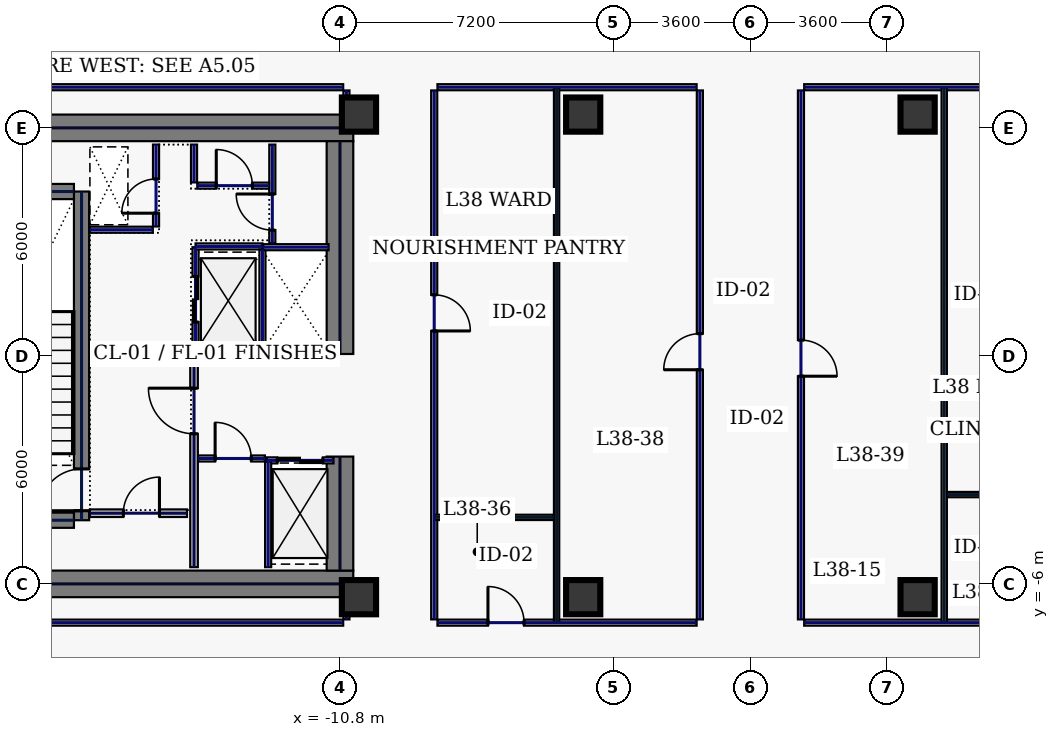
"""IFC4 building model, lengths in metres.
Left out: names, types, materials, properties, quantities, classifications, styles, units other than length and angle.
Written with IfcOpenShell. Run it as: python <this file> out.ifc"""

import sys

from ifc_helpers import new_model, si_unit, direction, frame, frame_2d, origin, origin_2d, place, context, subcontext, project, spatial, rectangle, hollow_rectangle, extrude, element, fill, save


model = new_model("IFC4")
c1 = context("Model", 3, precision=1e-05, world=origin(), true_north=direction((0.0, 1.0)))
c2 = subcontext(c1, "Body", "Model", "MODEL_VIEW")
j1 = project(units=[si_unit("LENGTHUNIT", "METRE"), si_unit("PLANEANGLEUNIT", "RADIAN")], contexts=[c1])
p1 = place(None, origin())
s1 = spatial("IfcSite", under=j1, at=p1, CompositionType="ELEMENT")
p2 = place(p1, origin())
s2 = spatial("IfcBuilding", under=s1, at=p2, CompositionType="ELEMENT")
p3 = place(p2, frame((0.0, 0.0, 168.2)))
s3 = spatial("IfcBuildingStorey", under=s2, at=p3, CompositionType="ELEMENT", Elevation=168.2)
for number, where, z_axis, x_axis in (
    (1, (-22.0, 6.0, 0.0), (0.0, 0.0, 1.0), (1.0, 0.0, 0.0)),
    (2, (-22.0, -6.0, 0.0), (0.0, 0.0, 1.0), (1.0, 0.0, 0.0)),
):
    element("IfcWall", number, at=place(p3, frame(where, z_axis=z_axis, x_axis=x_axis)), inside=s3, PredefinedType="SHEAR", context=c2, shape_type="SweptSolid", body=[
        extrude(rectangle(XDim=11.55, YDim=0.7, at=frame_2d((5.775, 0.0))), origin(), (0.0, 0.0, 1.0), 3.74),
    ])
p4 = place(p3, frame((-10.8, -5.65, 0.0), z_axis=(0.0, 0.0, 1.0), x_axis=(0.0, 1.0, 0.0)))
e3 = element("IfcWall", 3, at=p4, inside=s3, PredefinedType="SHEAR", context=c2, shape_type="SweptSolid", body=[
    extrude(rectangle(XDim=3.0, YDim=0.7, at=frame_2d((1.5, 0.0))), origin(), (0.0, 0.0, 1.0), 3.74),
])
p5 = place(p3, frame((-10.8, 0.05, 0.0), z_axis=(0.0, 0.0, 1.0), x_axis=(0.0, 1.0, 0.0)))
e4 = element("IfcWall", 4, at=p5, inside=s3, PredefinedType="SHEAR", context=c2, shape_type="SweptSolid", body=[
    extrude(rectangle(XDim=5.6, YDim=0.7, at=frame_2d((2.8, 0.0))), origin(), (0.0, 0.0, 1.0), 3.74),
])
p6 = place(p3, frame((-17.6, -4.325, 0.0), z_axis=(0.0, 0.0, 1.0), x_axis=(0.0, 1.0, 0.0)))
e5 = element("IfcWall", 5, at=p6, inside=s3, PredefinedType="SHEAR", context=c2, shape_type="SweptSolid", body=[
    extrude(rectangle(XDim=8.65, YDim=0.4, at=frame_2d((4.325, 0.0))), origin(), (0.0, 0.0, 1.0), 3.74),
])
p7 = place(p6, frame((0.25, 0.0, 0.0)))
e6 = element("IfcOpeningElement", 6, at=p7, cuts=e5, PredefinedType="OPENING", context=c2, shape_type="SweptSolid", body=[
    extrude(rectangle(XDim=1.1, YDim=2.2, at=frame_2d((0.55, 1.1))), frame((0.0, 0.21, 0.0), z_axis=(0.0, -1.0, 0.0), x_axis=(1.0, 0.0, 0.0)), (0.0, 0.0, 1.0), 0.42),
])
for number, where, z_axis, x_axis in (
    (7, (-21.2, -4.325, 0.0), (0.0, 0.0, 1.0), (1.0, 0.0, 0.0)),
    (8, (-21.2, 4.325, 0.0), (0.0, 0.0, 1.0), (1.0, 0.0, 0.0)),
):
    element("IfcWall", number, at=place(p3, frame(where, z_axis=z_axis, x_axis=x_axis)), inside=s3, PredefinedType="SHEAR", context=c2, shape_type="SweptSolid", body=[
        extrude(rectangle(XDim=3.4, YDim=0.4, at=frame_2d((1.7, 0.0))), origin(), (0.0, 0.0, 1.0), 3.74),
    ])
for number, where, z_axis, x_axis in (
    (9, (-10.3, -6.35, 0.0), (0.0, 0.0, 1.0), (1.0, 0.0, 0.0)),
    (10, (-10.3, 6.35, 0.0), (0.0, 0.0, 1.0), (1.0, 0.0, 0.0)),
    (11, (-4.4, -6.35, 0.0), (0.0, 0.0, 1.0), (1.0, 0.0, 0.0)),
    (12, (4.4, -6.35, 0.0), (0.0, 0.0, 1.0), (1.0, 0.0, 0.0)),
    (13, (-4.4, 6.35, 0.0), (0.0, 0.0, 1.0), (1.0, 0.0, 0.0)),
    (14, (4.4, 6.35, 0.0), (0.0, 0.0, 1.0), (1.0, 0.0, 0.0)),
):
    element("IfcColumn", number, at=place(p3, frame(where, z_axis=z_axis, x_axis=x_axis)), inside=s3, PredefinedType="COLUMN", context=c2, shape_type="SweptSolid", body=[
        extrude(hollow_rectangle(XDim=0.9, YDim=0.9, WallThickness=0.04, at=origin_2d()), origin(), (0.0, 0.0, 1.0), 3.74),
    ])
p8 = place(p3, frame((-14.6, 0.12, 0.0), z_axis=(0.0, 0.0, 1.0), x_axis=(0.0, 1.0, 0.0)))
e15 = element("IfcWall", 15, at=p8, inside=s3, PredefinedType="PARTITIONING", context=c2, shape_type="SweptSolid", body=[
    extrude(rectangle(XDim=2.74, YDim=0.16, at=frame_2d((1.37, 0.0))), origin(), (0.0, 0.0, 1.0), 3.74),
])
p9 = place(p8, frame((0.77, 0.0, 0.0)))
e16 = element("IfcOpeningElement", 16, at=p9, cuts=e15, PredefinedType="OPENING", context=c2, shape_type="SweptSolid", body=[
    extrude(rectangle(XDim=1.2, YDim=2.2, at=frame_2d((0.6, 1.1))), frame((0.0, 0.09, 0.0), z_axis=(0.0, -1.0, 0.0), x_axis=(1.0, 0.0, 0.0)), (0.0, 0.0, 1.0), 0.18),
])
for number, where, z_axis, x_axis in (
    (17, (-14.6, 0.1, 0.0), (0.0, 0.0, 1.0), (1.0, 0.0, 0.0)),
    (18, (-14.6, 2.88, 0.0), (0.0, 0.0, 1.0), (1.0, 0.0, 0.0)),
):
    element("IfcWall", number, at=place(p3, frame(where, z_axis=z_axis, x_axis=x_axis)), inside=s3, PredefinedType="PARTITIONING", context=c2, shape_type="SweptSolid", body=[
        extrude(rectangle(XDim=1.76, YDim=0.16, at=frame_2d((0.88, 0.0))), origin(), (0.0, 0.0, 1.0), 3.74),
    ])
p10 = place(p3, frame((-12.84, 0.18, 0.0), z_axis=(0.0, 0.0, 1.0), x_axis=(0.0, 1.0, 0.0)))
e19 = element("IfcWall", 19, at=p10, inside=s3, PredefinedType="PARTITIONING", context=c2, shape_type="SweptSolid", body=[
    extrude(rectangle(XDim=2.62, YDim=0.16, at=frame_2d((1.31, 0.0))), origin(), (0.0, 0.0, 1.0), 3.74),
])
p11 = place(p3, frame((-12.73, -2.75, 0.0), z_axis=(0.0, 0.0, 1.0), x_axis=(1.0, 0.0, 0.0)))
e20 = element("IfcWall", 20, at=p11, inside=s3, PredefinedType="PARTITIONING", context=c2, shape_type="SweptSolid", body=[
    extrude(rectangle(XDim=1.76, YDim=0.16, at=frame_2d((0.88, 0.0))), origin(), (0.0, 0.0, 1.0), 3.74),
])
p12 = place(p11, frame((0.28, 0.0, 0.0)))
e21 = element("IfcOpeningElement", 21, at=p12, cuts=e20, PredefinedType="OPENING", context=c2, shape_type="SweptSolid", body=[
    extrude(rectangle(XDim=1.2, YDim=2.2, at=frame_2d((0.6, 1.1))), frame((0.0, 0.09, 0.0), z_axis=(0.0, -1.0, 0.0), x_axis=(1.0, 0.0, 0.0)), (0.0, 0.0, 1.0), 0.18),
])
for number, where, z_axis, x_axis in (
    (22, (-12.82, 0.06, 0.0), (0.0, 0.0, 1.0), (1.0, 0.0, 0.0)),
    (23, (-12.82, 2.86, 0.0), (0.0, 0.0, 1.0), (1.0, 0.0, 0.0)),
):
    element("IfcWall", number, at=place(p3, frame(where, z_axis=z_axis, x_axis=x_axis)), inside=s3, PredefinedType="PARTITIONING", context=c2, shape_type="SweptSolid", body=[
        extrude(rectangle(XDim=1.72, YDim=0.16, at=frame_2d((0.86, 0.0))), origin(), (0.0, 0.0, 1.0), 3.74),
    ])
p13 = place(p3, frame((-15.64, 3.405, 0.0), z_axis=(0.0, 0.0, 1.0), x_axis=(0.0, 1.0, 0.0)))
e24 = element("IfcWall", 24, at=p13, inside=s3, PredefinedType="PARTITIONING", context=c2, shape_type="SweptSolid", body=[
    extrude(rectangle(XDim=2.155, YDim=0.16, at=frame_2d((1.078, 0.0))), origin(), (0.0, 0.0, 1.0), 3.74),
])
p14 = place(p13, frame((0.35, 0.0, 0.0)))
e25 = element("IfcOpeningElement", 25, at=p14, cuts=e24, PredefinedType="OPENING", context=c2, shape_type="SweptSolid", body=[
    extrude(rectangle(XDim=0.9, YDim=2.2, at=frame_2d((0.45, 1.1))), frame((0.0, 0.09, 0.0), z_axis=(0.0, -1.0, 0.0), x_axis=(1.0, 0.0, 0.0)), (0.0, 0.0, 1.0), 0.18),
])
p15 = place(p3, frame((-17.38, 3.32, 0.0), z_axis=(0.0, 0.0, 1.0), x_axis=(1.0, 0.0, 0.0)))
e26 = element("IfcWall", 26, at=p15, inside=s3, PredefinedType="PARTITIONING", context=c2, shape_type="SweptSolid", body=[
    extrude(rectangle(XDim=1.655, YDim=0.16, at=frame_2d((0.827, 0.0))), origin(), (0.0, 0.0, 1.0), 3.74),
])
p16 = place(p3, frame((-17.38, -4.14, 0.0), z_axis=(0.0, 0.0, 1.0), x_axis=(1.0, 0.0, 0.0)))
e27 = element("IfcWall", 27, at=p16, inside=s3, PredefinedType="SOLIDWALL", context=c2, shape_type="SweptSolid", body=[
    extrude(rectangle(XDim=2.555, YDim=0.2, at=frame_2d((1.277, 0.0))), origin(), (0.0, 0.0, 1.0), 3.74),
])
p17 = place(p16, frame((0.88, 0.0, 0.0)))
e28 = element("IfcOpeningElement", 28, at=p17, cuts=e27, PredefinedType="OPENING", context=c2, shape_type="SweptSolid", body=[
    extrude(rectangle(XDim=0.95, YDim=2.2, at=frame_2d((0.475, 1.1))), frame((0.0, 0.11, 0.0), z_axis=(0.0, -1.0, 0.0), x_axis=(1.0, 0.0, 0.0)), (0.0, 0.0, 1.0), 0.22),
])
p18 = place(p3, frame((-14.535, -2.7, 0.0), z_axis=(0.0, 0.0, 1.0), x_axis=(1.0, 0.0, 0.0)))
e29 = element("IfcWall", 29, at=p18, inside=s3, PredefinedType="PARTITIONING", context=c2, shape_type="SweptSolid", body=[
    extrude(rectangle(XDim=1.76, YDim=0.16, at=frame_2d((0.88, 0.0))), origin(), (0.0, 0.0, 1.0), 3.74),
])
p19 = place(p18, frame((0.45, 0.0, 0.0)))
e30 = element("IfcOpeningElement", 30, at=p19, cuts=e29, PredefinedType="OPENING", context=c2, shape_type="SweptSolid", body=[
    extrude(rectangle(XDim=0.95, YDim=2.2, at=frame_2d((0.475, 1.1))), frame((0.0, 0.09, 0.0), z_axis=(0.0, -1.0, 0.0), x_axis=(1.0, 0.0, 0.0)), (0.0, 0.0, 1.0), 0.18),
])
p20 = place(p3, frame((-12.69, -5.56, 0.0), z_axis=(0.0, 0.0, 1.0), x_axis=(0.0, 1.0, 0.0)))
e31 = element("IfcWall", 31, at=p20, inside=s3, PredefinedType="PARTITIONING", context=c2, shape_type="SweptSolid", body=[
    extrude(rectangle(XDim=2.775, YDim=0.16, at=frame_2d((1.388, 0.0))), origin(), (0.0, 0.0, 1.0), 3.74),
])
p21 = place(p3, frame((-12.58, 2.96, 0.0), z_axis=(0.0, 0.0, 1.0), x_axis=(0.0, 1.0, 0.0)))
e32 = element("IfcWall", 32, at=p21, inside=s3, PredefinedType="PARTITIONING", context=c2, shape_type="SweptSolid", body=[
    extrude(rectangle(XDim=2.6, YDim=0.16, at=frame_2d((1.3, 0.0))), origin(), (0.0, 0.0, 1.0), 3.74),
])
p22 = place(p21, frame((0.35, 0.0, 0.0)))
e33 = element("IfcOpeningElement", 33, at=p22, cuts=e32, PredefinedType="OPENING", context=c2, shape_type="SweptSolid", body=[
    extrude(rectangle(XDim=0.95, YDim=2.2, at=frame_2d((0.475, 1.1))), frame((0.0, 0.09, 0.0), z_axis=(0.0, -1.0, 0.0), x_axis=(1.0, 0.0, 0.0)), (0.0, 0.0, 1.0), 0.18),
])
p23 = place(p3, frame((-14.555, 4.48, 0.0), z_axis=(0.0, 0.0, 1.0), x_axis=(1.0, 0.0, 0.0)))
e34 = element("IfcWall", 34, at=p23, inside=s3, PredefinedType="PARTITIONING", context=c2, shape_type="SweptSolid", body=[
    extrude(rectangle(XDim=1.89, YDim=0.16, at=frame_2d((0.945, 0.0))), origin(), (0.0, 0.0, 1.0), 3.74),
])
p24 = place(p23, frame((0.5, 0.0, 0.0)))
e35 = element("IfcOpeningElement", 35, at=p24, cuts=e34, PredefinedType="OPENING", context=c2, shape_type="SweptSolid", body=[
    extrude(rectangle(XDim=0.95, YDim=2.2, at=frame_2d((0.475, 1.1))), frame((0.0, 0.09, 0.0), z_axis=(0.0, -1.0, 0.0), x_axis=(1.0, 0.0, 0.0)), (0.0, 0.0, 1.0), 0.18),
])
p25 = place(p3, frame((-14.64, 4.565, 0.0), z_axis=(0.0, 0.0, 1.0), x_axis=(0.0, 1.0, 0.0)))
e36 = element("IfcWall", 36, at=p25, inside=s3, PredefinedType="PARTITIONING", context=c2, shape_type="SweptSolid", body=[
    extrude(rectangle(XDim=0.995, YDim=0.16, at=frame_2d((0.498, 0.0))), origin(), (0.0, 0.0, 1.0), 3.74),
])
p26 = place(p3, frame((-14.64, -5.56, 0.0), z_axis=(0.0, 0.0, 1.0), x_axis=(0.0, 1.0, 0.0)))
e37 = element("IfcWall", 37, at=p26, inside=s3, PredefinedType="SOLIDWALL", context=c2, shape_type="SweptSolid", body=[
    extrude(rectangle(XDim=5.6, YDim=0.2, at=frame_2d((2.8, 0.0))), origin(), (0.0, 0.0, 1.0), 3.74),
])
p27 = place(p26, frame((3.51, 0.0, 0.0)))
e38 = element("IfcOpeningElement", 38, at=p27, cuts=e37, PredefinedType="OPENING", context=c2, shape_type="SweptSolid", body=[
    extrude(rectangle(XDim=1.2, YDim=2.2, at=frame_2d((0.6, 1.1))), frame((0.0, 0.11, 0.0), z_axis=(0.0, -1.0, 0.0), x_axis=(1.0, 0.0, 0.0)), (0.0, 0.0, 1.0), 0.22),
])
p28 = place(p3, frame((-24.965, -7.02, 0.0), z_axis=(0.0, 0.0, 1.0), x_axis=(1.0, 0.0, 0.0)))
e39 = element("IfcWall", 39, at=p28, inside=s3, PredefinedType="PARTITIONING", context=c2, shape_type="SweptSolid", body=[
    extrude(rectangle(XDim=14.25, YDim=0.16, at=frame_2d((7.125, 0.0))), origin(), (0.0, 0.0, 1.0), 3.74),
])
p29 = place(p3, frame((-10.63, -6.935, 0.0), z_axis=(0.0, 0.0, 1.0), x_axis=(0.0, 1.0, 0.0)))
e40 = element("IfcWall", 40, at=p29, inside=s3, PredefinedType="PARTITIONING", context=c2, shape_type="SweptSolid", body=[
    extrude(rectangle(XDim=0.515, YDim=0.16, at=frame_2d((0.258, 0.0))), origin(), (0.0, 0.0, 1.0), 3.74),
])
p30 = place(p3, frame((-10.63, 6.42, 0.0), z_axis=(0.0, 0.0, 1.0), x_axis=(0.0, 1.0, 0.0)))
e41 = element("IfcWall", 41, at=p30, inside=s3, PredefinedType="PARTITIONING", context=c2, shape_type="SweptSolid", body=[
    extrude(rectangle(XDim=0.565, YDim=0.16, at=frame_2d((0.283, 0.0))), origin(), (0.0, 0.0, 1.0), 3.74),
])
p31 = place(p3, frame((-10.715, 7.07, 0.0), z_axis=(0.0, 0.0, 1.0), x_axis=(-1.0, 0.0, 0.0)))
e42 = element("IfcWall", 42, at=p31, inside=s3, PredefinedType="PARTITIONING", context=c2, shape_type="SweptSolid", body=[
    extrude(rectangle(XDim=14.25, YDim=0.16, at=frame_2d((7.125, 0.0))), origin(), (0.0, 0.0, 1.0), 3.74),
])
p32 = place(p3, frame((8.235, 7.07, 0.0), z_axis=(0.0, 0.0, 1.0), x_axis=(-1.0, 0.0, 0.0)))
e43 = element("IfcWall", 43, at=p32, inside=s3, PredefinedType="PARTITIONING", context=c2, shape_type="SweptSolid", body=[
    extrude(rectangle(XDim=6.82, YDim=0.16, at=frame_2d((3.41, 0.0))), origin(), (0.0, 0.0, 1.0), 3.74),
])
p33 = place(p3, frame((1.33, 6.985, 0.0), z_axis=(0.0, 0.0, 1.0), x_axis=(0.0, -1.0, 0.0)))
e44 = element("IfcWall", 44, at=p33, inside=s3, PredefinedType="PARTITIONING", context=c2, shape_type="SweptSolid", body=[
    extrude(rectangle(XDim=13.92, YDim=0.16, at=frame_2d((6.96, 0.0))), origin(), (0.0, 0.0, 1.0), 3.74),
])
p34 = place(p33, frame((6.57, 0.0, 0.0)))
e45 = element("IfcOpeningElement", 45, at=p34, cuts=e44, PredefinedType="OPENING", context=c2, shape_type="SweptSolid", body=[
    extrude(rectangle(XDim=0.95, YDim=2.2, at=frame_2d((0.475, 1.1))), frame((0.0, 0.09, 0.0), z_axis=(0.0, -1.0, 0.0), x_axis=(1.0, 0.0, 0.0)), (0.0, 0.0, 1.0), 0.18),
])
p35 = place(p3, frame((1.415, -7.02, 0.0), z_axis=(0.0, 0.0, 1.0), x_axis=(1.0, 0.0, 0.0)))
e46 = element("IfcWall", 46, at=p35, inside=s3, PredefinedType="PARTITIONING", context=c2, shape_type="SweptSolid", body=[
    extrude(rectangle(XDim=6.82, YDim=0.16, at=frame_2d((3.41, 0.0))), origin(), (0.0, 0.0, 1.0), 3.74),
])
p36 = place(p3, frame((-1.33, -6.935, 0.0), z_axis=(0.0, 0.0, 1.0), x_axis=(0.0, 1.0, 0.0)))
e47 = element("IfcWall", 47, at=p36, inside=s3, PredefinedType="PARTITIONING", context=c2, shape_type="SweptSolid", body=[
    extrude(rectangle(XDim=13.92, YDim=0.16, at=frame_2d((6.96, 0.0))), origin(), (0.0, 0.0, 1.0), 3.74),
])
p37 = place(p36, frame((6.57, 0.0, 0.0)))
e48 = element("IfcOpeningElement", 48, at=p37, cuts=e47, PredefinedType="OPENING", context=c2, shape_type="SweptSolid", body=[
    extrude(rectangle(XDim=0.95, YDim=2.2, at=frame_2d((0.475, 1.1))), frame((0.0, 0.09, 0.0), z_axis=(0.0, -1.0, 0.0), x_axis=(1.0, 0.0, 0.0)), (0.0, 0.0, 1.0), 0.18),
])
p38 = place(p3, frame((-1.415, 7.07, 0.0), z_axis=(0.0, 0.0, 1.0), x_axis=(-1.0, 0.0, 0.0)))
e49 = element("IfcWall", 49, at=p38, inside=s3, PredefinedType="PARTITIONING", context=c2, shape_type="SweptSolid", body=[
    extrude(rectangle(XDim=6.82, YDim=0.16, at=frame_2d((3.41, 0.0))), origin(), (0.0, 0.0, 1.0), 3.74),
])
p39 = place(p3, frame((-8.32, 6.985, 0.0), z_axis=(0.0, 0.0, 1.0), x_axis=(0.0, -1.0, 0.0)))
e50 = element("IfcWall", 50, at=p39, inside=s3, PredefinedType="PARTITIONING", context=c2, shape_type="SweptSolid", body=[
    extrude(rectangle(XDim=13.92, YDim=0.16, at=frame_2d((6.96, 0.0))), origin(), (0.0, 0.0, 1.0), 3.74),
])
p40 = place(p39, frame((5.379, 0.0, 0.0)))
e51 = element("IfcOpeningElement", 51, at=p40, cuts=e50, PredefinedType="OPENING", context=c2, shape_type="SweptSolid", body=[
    extrude(rectangle(XDim=0.95, YDim=2.2, at=frame_2d((0.475, 1.1))), frame((0.0, 0.09, 0.0), z_axis=(0.0, -1.0, 0.0), x_axis=(1.0, 0.0, 0.0)), (0.0, 0.0, 1.0), 0.18),
])
p41 = place(p3, frame((-8.235, -7.02, 0.0), z_axis=(0.0, 0.0, 1.0), x_axis=(1.0, 0.0, 0.0)))
e52 = element("IfcWall", 52, at=p41, inside=s3, PredefinedType="PARTITIONING", context=c2, shape_type="SweptSolid", body=[
    extrude(rectangle(XDim=6.82, YDim=0.16, at=frame_2d((3.41, 0.0))), origin(), (0.0, 0.0, 1.0), 3.74),
])
p42 = place(p41, frame((1.329, 0.0, 0.0)))
e53 = element("IfcOpeningElement", 53, at=p42, cuts=e52, PredefinedType="OPENING", context=c2, shape_type="SweptSolid", body=[
    extrude(rectangle(XDim=0.95, YDim=2.2, at=frame_2d((0.475, 1.1))), frame((0.0, 0.09, 0.0), z_axis=(0.0, -1.0, 0.0), x_axis=(1.0, 0.0, 0.0)), (0.0, 0.0, 1.0), 0.18),
])
for number, where, z_axis, x_axis in (
    (54, (-5.1, -7.015, 0.0), (0.0, 0.0, 1.0), (0.0, 1.0, 0.0)),
    (55, (5.1, -7.015, 0.0), (0.0, 0.0, 1.0), (0.0, 1.0, 0.0)),
):
    element("IfcWall", number, at=place(p3, frame(where, z_axis=z_axis, x_axis=x_axis)), inside=s3, PredefinedType="PARTITIONING", context=c2, shape_type="SweptSolid", body=[
        extrude(rectangle(XDim=14.08, YDim=0.14, at=frame_2d((7.04, 0.0))), origin(), (0.0, 0.0, 1.0), 3.74),
    ])
for number, where, z_axis, x_axis in (
    (56, (-8.315, -4.25, 0.0), (0.0, 0.0, 1.0), (1.0, 0.0, 0.0)),
    (57, (5.175, -3.65, 0.0), (0.0, 0.0, 1.0), (1.0, 0.0, 0.0)),
):
    element("IfcWall", number, at=place(p3, frame(where, z_axis=z_axis, x_axis=x_axis)), inside=s3, PredefinedType="PARTITIONING", context=c2, shape_type="SweptSolid", body=[
        extrude(rectangle(XDim=3.14, YDim=0.14, at=frame_2d((1.57, 0.0))), origin(), (0.0, 0.0, 1.0), 3.74),
    ])
p43 = place(p7, origin())
e58 = element("IfcDoor", 58, at=p43, inside=s3, OperationType="SINGLE_SWING_LEFT", PredefinedType="DOOR", context=c2, shape_type="SweptSolid", body=[
    extrude(rectangle(XDim=1.1, YDim=2.2, at=frame_2d((0.55, 1.1))), frame((0.0, 0.025, 0.0), z_axis=(0.0, -1.0, 0.0), x_axis=(1.0, 0.0, 0.0)), (0.0, 0.0, 1.0), 0.05),
])
fill(e6, e58)
p44 = place(p9, origin())
e59 = element("IfcDoor", 59, at=p44, inside=s3, OperationType="SLIDING_TO_LEFT", PredefinedType="DOOR", context=c2, shape_type="SweptSolid", body=[
    extrude(rectangle(XDim=1.2, YDim=2.2, at=frame_2d((0.6, 1.1))), frame((0.0, 0.025, 0.0), z_axis=(0.0, -1.0, 0.0), x_axis=(1.0, 0.0, 0.0)), (0.0, 0.0, 1.0), 0.05),
])
fill(e16, e59)
p45 = place(p12, origin())
e60 = element("IfcDoor", 60, at=p45, inside=s3, OperationType="SLIDING_TO_LEFT", PredefinedType="DOOR", context=c2, shape_type="SweptSolid", body=[
    extrude(rectangle(XDim=1.2, YDim=2.2, at=frame_2d((0.6, 1.1))), frame((0.0, 0.025, 0.0), z_axis=(0.0, -1.0, 0.0), x_axis=(1.0, 0.0, 0.0)), (0.0, 0.0, 1.0), 0.05),
])
fill(e21, e60)
p46 = place(p14, origin())
e61 = element("IfcDoor", 61, at=p46, inside=s3, OperationType="SINGLE_SWING_LEFT", PredefinedType="DOOR", context=c2, shape_type="SweptSolid", body=[
    extrude(rectangle(XDim=0.9, YDim=2.2, at=frame_2d((0.45, 1.1))), frame((0.0, 0.025, 0.0), z_axis=(0.0, -1.0, 0.0), x_axis=(1.0, 0.0, 0.0)), (0.0, 0.0, 1.0), 0.05),
])
fill(e25, e61)
p47 = place(p17, origin())
e62 = element("IfcDoor", 62, at=p47, inside=s3, OperationType="SINGLE_SWING_RIGHT", PredefinedType="DOOR", context=c2, shape_type="SweptSolid", body=[
    extrude(rectangle(XDim=0.95, YDim=2.2, at=frame_2d((0.475, 1.1))), frame((0.0, 0.025, 0.0), z_axis=(0.0, -1.0, 0.0), x_axis=(1.0, 0.0, 0.0)), (0.0, 0.0, 1.0), 0.05),
])
fill(e28, e62)
p48 = place(p19, origin())
e63 = element("IfcDoor", 63, at=p48, inside=s3, OperationType="SINGLE_SWING_LEFT", PredefinedType="DOOR", context=c2, shape_type="SweptSolid", body=[
    extrude(rectangle(XDim=0.95, YDim=2.2, at=frame_2d((0.475, 1.1))), frame((0.0, 0.025, 0.0), z_axis=(0.0, -1.0, 0.0), x_axis=(1.0, 0.0, 0.0)), (0.0, 0.0, 1.0), 0.05),
])
fill(e30, e63)
p49 = place(p22, origin())
e64 = element("IfcDoor", 64, at=p49, inside=s3, OperationType="SINGLE_SWING_RIGHT", PredefinedType="DOOR", context=c2, shape_type="SweptSolid", body=[
    extrude(rectangle(XDim=0.95, YDim=2.2, at=frame_2d((0.475, 1.1))), frame((0.0, 0.025, 0.0), z_axis=(0.0, -1.0, 0.0), x_axis=(1.0, 0.0, 0.0)), (0.0, 0.0, 1.0), 0.05),
])
fill(e33, e64)
p50 = place(p24, origin())
e65 = element("IfcDoor", 65, at=p50, inside=s3, OperationType="SINGLE_SWING_LEFT", PredefinedType="DOOR", context=c2, shape_type="SweptSolid", body=[
    extrude(rectangle(XDim=0.95, YDim=2.2, at=frame_2d((0.475, 1.1))), frame((0.0, 0.025, 0.0), z_axis=(0.0, -1.0, 0.0), x_axis=(1.0, 0.0, 0.0)), (0.0, 0.0, 1.0), 0.05),
])
fill(e35, e65)
p51 = place(p27, origin())
e66 = element("IfcDoor", 66, at=p51, inside=s3, OperationType="SINGLE_SWING_RIGHT", PredefinedType="DOOR", context=c2, shape_type="SweptSolid", body=[
    extrude(rectangle(XDim=1.2, YDim=2.2, at=frame_2d((0.6, 1.1))), frame((0.0, 0.025, 0.0), z_axis=(0.0, -1.0, 0.0), x_axis=(1.0, 0.0, 0.0)), (0.0, 0.0, 1.0), 0.05),
])
fill(e38, e66)
p52 = place(p42, origin())
e67 = element("IfcDoor", 67, at=p52, inside=s3, OperationType="SINGLE_SWING_LEFT", PredefinedType="DOOR", context=c2, shape_type="SweptSolid", body=[
    extrude(rectangle(XDim=0.95, YDim=2.2, at=frame_2d((0.475, 1.1))), frame((0.0, 0.025, 0.0), z_axis=(0.0, -1.0, 0.0), x_axis=(1.0, 0.0, 0.0)), (0.0, 0.0, 1.0), 0.05),
])
fill(e53, e67)
p53 = place(p40, origin())
e68 = element("IfcDoor", 68, at=p53, inside=s3, OperationType="SINGLE_SWING_RIGHT", PredefinedType="DOOR", context=c2, shape_type="SweptSolid", body=[
    extrude(rectangle(XDim=0.95, YDim=2.2, at=frame_2d((0.475, 1.1))), frame((0.0, 0.025, 0.0), z_axis=(0.0, -1.0, 0.0), x_axis=(1.0, 0.0, 0.0)), (0.0, 0.0, 1.0), 0.05),
])
fill(e51, e68)
p54 = place(p37, origin())
e69 = element("IfcDoor", 69, at=p54, inside=s3, OperationType="SINGLE_SWING_LEFT", PredefinedType="DOOR", context=c2, shape_type="SweptSolid", body=[
    extrude(rectangle(XDim=0.95, YDim=2.2, at=frame_2d((0.475, 1.1))), frame((0.0, 0.025, 0.0), z_axis=(0.0, -1.0, 0.0), x_axis=(1.0, 0.0, 0.0)), (0.0, 0.0, 1.0), 0.05),
])
fill(e48, e69)
p55 = place(p34, origin())
e70 = element("IfcDoor", 70, at=p55, inside=s3, OperationType="SINGLE_SWING_RIGHT", PredefinedType="DOOR", context=c2, shape_type="SweptSolid", body=[
    extrude(rectangle(XDim=0.95, YDim=2.2, at=frame_2d((0.475, 1.1))), frame((0.0, 0.025, 0.0), z_axis=(0.0, -1.0, 0.0), x_axis=(1.0, 0.0, 0.0)), (0.0, 0.0, 1.0), 0.05),
])
fill(e45, e70)
save(model, sys.argv[1])
